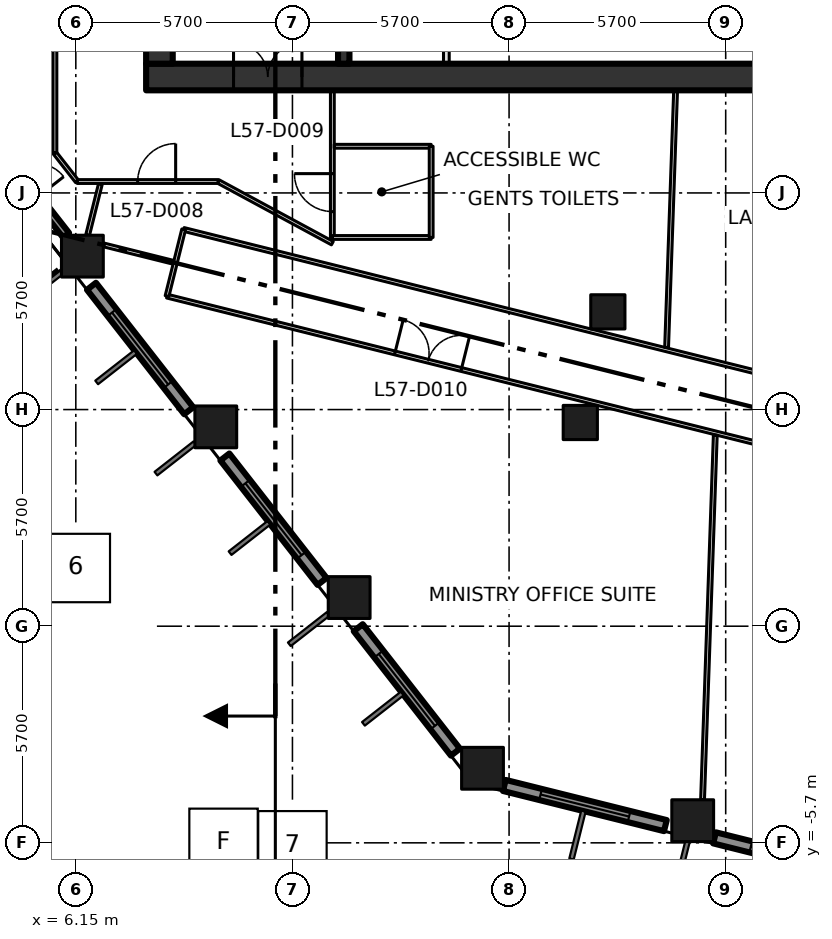
"""IFC4 building model, lengths in metres.
Left out: names, types, materials, properties, quantities, classifications, styles, units other than length and angle.
Written with IfcOpenShell. Run it as: python <this file> out.ifc"""

import sys

from ifc_helpers import new_model, si_unit, direction, frame, frame_2d, origin, origin_2d, place, context, subcontext, project, spatial, rectangle, extrude, element, fill, save


model = new_model("IFC4")
c1 = context("Model", 3, precision=1e-05, world=origin(), true_north=direction((0.0, 1.0)))
c2 = subcontext(c1, "Body", "Model", "MODEL_VIEW")
j1 = project(units=[si_unit("LENGTHUNIT", "METRE"), si_unit("PLANEANGLEUNIT", "RADIAN")], contexts=[c1])
p1 = place(None, origin())
s1 = spatial("IfcSite", under=j1, at=p1, CompositionType="ELEMENT")
p2 = place(p1, origin())
s2 = spatial("IfcBuilding", under=s1, at=p2, CompositionType="ELEMENT")
p3 = place(p2, frame((0.0, 0.0, 250.8)))
s3 = spatial("IfcBuildingStorey", under=s2, at=p3, CompositionType="ELEMENT", Elevation=250.8)
for number, where, z_axis, x_axis in (
    (1, (16.851, -3.738, 0.0), (0.0, 0.0, 1.0), (1.0, 0.0, 0.0)),
    (2, (13.342, 0.754, 0.0), (0.0, 0.0, 1.0), (1.0, 0.0, 0.0)),
    (3, (9.833, 5.245, 0.0), (0.0, 0.0, 1.0), (1.0, 0.0, 0.0)),
    (4, (6.323, 9.737, 0.0), (0.0, 0.0, 1.0), (1.0, 0.0, 0.0)),
    (5, (22.382, -5.117, 0.0), (0.0, 0.0, 1.0), (1.0, 0.0, 0.0)),
):
    element("IfcColumn", number, at=place(p3, frame(where, z_axis=z_axis, x_axis=x_axis)), inside=s3, PredefinedType="COLUMN", context=c2, shape_type="SweptSolid", body=[
        extrude(rectangle(XDim=1.1, YDim=1.1, at=origin_2d()), origin(), (0.0, 0.0, 1.0), 4.2),
    ])
for number, where, z_axis, x_axis in (
    (6, (19.424, 5.36, 0.0), (0.0, 0.0, 1.0), (1.0, 0.0, 0.0)),
    (7, (20.149, 8.271, 0.0), (0.0, 0.0, 1.0), (1.0, 0.0, 0.0)),
):
    element("IfcColumn", number, at=place(p3, frame(where, z_axis=z_axis, x_axis=x_axis)), inside=s3, PredefinedType="COLUMN", context=c2, shape_type="SweptSolid", body=[
        extrude(rectangle(XDim=0.9, YDim=0.9, at=origin_2d()), origin(), (0.0, 0.0, 1.0), 4.2),
    ])
p4 = place(p3, frame((8.0, 14.45, -0.3), z_axis=(0.0, 0.0, 1.0), x_axis=(1.0, 0.0, 0.0)))
e8 = element("IfcWall", 8, at=p4, inside=s3, PredefinedType="SHEAR", context=c2, shape_type="SweptSolid", body=[
    extrude(rectangle(XDim=22.8, YDim=0.7, at=frame_2d((11.4, 0.0))), origin(), (0.0, 0.0, 1.0), 4.2),
])
p5 = place(p4, frame((2.3, 0.0, 0.3)))
e9 = element("IfcOpeningElement", 9, at=p5, cuts=e8, PredefinedType="OPENING", context=c2, shape_type="SweptSolid", body=[
    extrude(rectangle(XDim=1.8, YDim=2.1, at=frame_2d((0.9, 1.05))), frame((0.0, 0.36, 0.0), z_axis=(0.0, -1.0, 0.0), x_axis=(1.0, 0.0, 0.0)), (0.0, 0.0, 1.0), 0.72),
])
p6 = place(p3, frame((8.35, 14.8, -0.3), z_axis=(0.0, 0.0, 1.0), x_axis=(0.0, 1.0, 0.0)))
e10 = element("IfcWall", 10, at=p6, inside=s3, PredefinedType="SHEAR", context=c2, shape_type="SweptSolid", body=[
    extrude(rectangle(XDim=20.9, YDim=0.7, at=frame_2d((10.45, 0.0))), origin(), (0.0, 0.0, 1.0), 4.2),
])
p7 = place(p3, frame((13.2, 14.8, 0.0), z_axis=(0.0, 0.0, 1.0), x_axis=(0.0, 1.0, 0.0)))
e11 = element("IfcWall", 11, at=p7, inside=s3, PredefinedType="SHEAR", context=c2, shape_type="SweptSolid", body=[
    extrude(rectangle(XDim=20.9, YDim=0.3, at=frame_2d((10.45, 0.0))), origin(), (0.0, 0.0, 1.0), 3.9),
])
p8 = place(p7, frame((3.5, 0.0, 0.0)))
e12 = element("IfcOpeningElement", 12, at=p8, cuts=e11, PredefinedType="OPENING", context=c2, shape_type="SweptSolid", body=[
    extrude(rectangle(XDim=1.8, YDim=2.1, at=frame_2d((0.9, 1.05))), frame((0.0, 0.16, 0.0), z_axis=(0.0, -1.0, 0.0), x_axis=(1.0, 0.0, 0.0)), (0.0, 0.0, 1.0), 0.32),
])
p9 = place(p7, frame((11.6, 0.0, 0.0)))
e13 = element("IfcOpeningElement", 13, at=p9, cuts=e11, PredefinedType="OPENING", context=c2, shape_type="SweptSolid", body=[
    extrude(rectangle(XDim=1.2, YDim=2.1, at=frame_2d((0.6, 1.05))), frame((0.0, 0.16, 0.0), z_axis=(0.0, -1.0, 0.0), x_axis=(1.0, 0.0, 0.0)), (0.0, 0.0, 1.0), 0.32),
])
p10 = place(p3, frame((15.9, 14.8, 0.0), z_axis=(0.0, 0.0, 1.0), x_axis=(0.0, 1.0, 0.0)))
e14 = element("IfcWall", 14, at=p10, inside=s3, PredefinedType="PARTITIONING", context=c2, shape_type="SweptSolid", body=[
    extrude(rectangle(XDim=2.825, YDim=0.15, at=frame_2d((1.413, 0.0))), origin(), (0.0, 0.0, 1.0), 3.9),
])
p11 = place(p3, frame((3.244, 13.679, 0.0), z_axis=(0.0, 0.0, 1.0), x_axis=(0.615682564618, -0.787994276392, 0.0)))
e15 = element("IfcWall", 15, at=p11, inside=s3, PredefinedType="SOLIDWALL", context=c2, shape_type="SweptSolid", body=[
    extrude(rectangle(XDim=4.304, YDim=0.2, at=frame_2d((2.152, 0.0))), origin(), (0.0, 0.0, 1.0), 3.15),
])
p12 = place(p11, frame((1.252, 0.0, 0.0)))
e16 = element("IfcOpeningElement", 16, at=p12, cuts=e15, PredefinedType="OPENING", context=c2, shape_type="SweptSolid", body=[
    extrude(rectangle(XDim=1.8, YDim=2.9, at=frame_2d((0.9, 1.45))), frame((0.0, 0.11, 0.0), z_axis=(0.0, -1.0, 0.0), x_axis=(1.0, 0.0, 0.0)), (0.0, 0.0, 1.0), 0.22),
])
p13 = place(p3, frame((6.562, 8.944, 0.0), z_axis=(0.0, 0.0, 1.0), x_axis=(0.615699893917, -0.787980736205, 0.0)))
e17 = element("IfcWall", 17, at=p13, inside=s3, PredefinedType="SOLIDWALL", context=c2, shape_type="SweptSolid", body=[
    extrude(rectangle(XDim=4.156, YDim=0.3, at=frame_2d((2.078, 0.0))), origin(), (0.0, 0.0, 1.0), 3.15),
])
p14 = place(p13, frame((0.878, 0.0, 0.8)))
e18 = element("IfcOpeningElement", 18, at=p14, cuts=e17, PredefinedType="OPENING", context=c2, shape_type="SweptSolid", body=[
    extrude(rectangle(XDim=2.4, YDim=2.1, at=frame_2d((1.2, 1.05))), frame((0.0, 0.16, 0.0), z_axis=(0.0, -1.0, 0.0), x_axis=(1.0, 0.0, 0.0)), (0.0, 0.0, 1.0), 0.32),
])
p15 = place(p3, frame((10.072, 4.452, 0.0), z_axis=(0.0, 0.0, 1.0), x_axis=(0.615660006568, -0.788011901124, 0.0)))
e19 = element("IfcWall", 19, at=p15, inside=s3, PredefinedType="SOLIDWALL", context=c2, shape_type="SweptSolid", body=[
    extrude(rectangle(XDim=4.155, YDim=0.3, at=frame_2d((2.077, 0.0))), origin(), (0.0, 0.0, 1.0), 3.15),
])
p16 = place(p15, frame((0.878, 0.0, 0.8)))
e20 = element("IfcOpeningElement", 20, at=p16, cuts=e19, PredefinedType="OPENING", context=c2, shape_type="SweptSolid", body=[
    extrude(rectangle(XDim=2.4, YDim=2.1, at=frame_2d((1.2, 1.05))), frame((0.0, 0.16, 0.0), z_axis=(0.0, -1.0, 0.0), x_axis=(1.0, 0.0, 0.0)), (0.0, 0.0, 1.0), 0.32),
])
p17 = place(p3, frame((13.581, -0.039, 0.0), z_axis=(0.0, 0.0, 1.0), x_axis=(0.615545986363, -0.788100969846, 0.0)))
e21 = element("IfcWall", 21, at=p17, inside=s3, PredefinedType="SOLIDWALL", context=c2, shape_type="SweptSolid", body=[
    extrude(rectangle(XDim=4.156, YDim=0.3, at=frame_2d((2.078, 0.0))), origin(), (0.0, 0.0, 1.0), 3.15),
])
p18 = place(p17, frame((0.878, 0.0, 0.8)))
e22 = element("IfcOpeningElement", 22, at=p18, cuts=e21, PredefinedType="OPENING", context=c2, shape_type="SweptSolid", body=[
    extrude(rectangle(XDim=2.4, YDim=2.1, at=frame_2d((1.2, 1.05))), frame((0.0, 0.16, 0.0), z_axis=(0.0, -1.0, 0.0), x_axis=(1.0, 0.0, 0.0)), (0.0, 0.0, 1.0), 0.32),
])
p19 = place(p3, frame((17.425, -4.19, 0.0), z_axis=(0.0, 0.0, 1.0), x_axis=(0.970270592847, -0.242022677978, 0.0)))
e23 = element("IfcWall", 23, at=p19, inside=s3, PredefinedType="SOLIDWALL", context=c2, shape_type="SweptSolid", body=[
    extrude(rectangle(XDim=4.368, YDim=0.3, at=frame_2d((2.184, 0.0))), origin(), (0.0, 0.0, 1.0), 3.15),
])
p20 = place(p19, frame((0.983, 0.0, 0.8)))
e24 = element("IfcOpeningElement", 24, at=p20, cuts=e23, PredefinedType="OPENING", context=c2, shape_type="SweptSolid", body=[
    extrude(rectangle(XDim=2.4, YDim=2.1, at=frame_2d((1.2, 1.05))), frame((0.0, 0.16, 0.0), z_axis=(0.0, -1.0, 0.0), x_axis=(1.0, 0.0, 0.0)), (0.0, 0.0, 1.0), 0.32),
])
p21 = place(p3, frame((22.956, -5.569, 0.0), z_axis=(0.0, 0.0, 1.0), x_axis=(0.970323116569, -0.241812012628, 0.0)))
e25 = element("IfcWall", 25, at=p21, inside=s3, PredefinedType="SOLIDWALL", context=c2, shape_type="SweptSolid", body=[
    extrude(rectangle(XDim=4.367, YDim=0.3, at=frame_2d((2.183, 0.0))), origin(), (0.0, 0.0, 1.0), 3.15),
])
p22 = place(p21, frame((0.983, 0.0, 0.8)))
e26 = element("IfcOpeningElement", 26, at=p22, cuts=e25, PredefinedType="OPENING", context=c2, shape_type="SweptSolid", body=[
    extrude(rectangle(XDim=2.4, YDim=2.1, at=frame_2d((1.2, 1.05))), frame((0.0, 0.16, 0.0), z_axis=(0.0, -1.0, 0.0), x_axis=(1.0, 0.0, 0.0)), (0.0, 0.0, 1.0), 0.32),
])
p23 = place(p3, frame((5.6, 12.45, 0.0), z_axis=(0.0, 0.0, 1.0), x_axis=(0.615644041972, -0.788024373725, 0.0)))
e27 = element("IfcWall", 27, at=p23, inside=s3, PredefinedType="PARTITIONING", context=c2, shape_type="SweptSolid", body=[
    extrude(rectangle(XDim=0.952, YDim=0.1, at=frame_2d((0.476, 0.0))), origin(), (0.0, 0.0, 1.0), 3.9),
])
p24 = place(p3, frame((5.6, 39.205, 0.0), z_axis=(0.0, 0.0, 1.0), x_axis=(0.0, -1.0, 0.0)))
e28 = element("IfcWall", 28, at=p24, inside=s3, PredefinedType="PARTITIONING", context=c2, shape_type="SweptSolid", body=[
    extrude(rectangle(XDim=26.755, YDim=0.1, at=frame_2d((13.377, 0.0))), origin(), (0.0, 0.0, 1.0), 3.9),
])
p25 = place(p24, frame((18.667, 0.0, 0.0)))
e29 = element("IfcOpeningElement", 29, at=p25, cuts=e28, PredefinedType="OPENING", context=c2, shape_type="SweptSolid", body=[
    extrude(rectangle(XDim=1.0, YDim=2.1, at=frame_2d((0.5, 1.05))), frame((0.0, 0.06, 0.0), z_axis=(0.0, -1.0, 0.0), x_axis=(1.0, 0.0, 0.0)), (0.0, 0.0, 1.0), 0.12),
])
p26 = place(p24, frame((5.08, 0.0, 0.0)))
e30 = element("IfcOpeningElement", 30, at=p26, cuts=e28, PredefinedType="OPENING", context=c2, shape_type="SweptSolid", body=[
    extrude(rectangle(XDim=1.0, YDim=2.1, at=frame_2d((0.5, 1.05))), frame((0.0, 0.06, 0.0), z_axis=(0.0, -1.0, 0.0), x_axis=(1.0, 0.0, 0.0)), (0.0, 0.0, 1.0), 0.12),
])
p27 = place(p3, frame((6.186, 11.7, 0.0), z_axis=(0.0, 0.0, 1.0), x_axis=(1.0, 0.0, 0.0)))
e31 = element("IfcWall", 31, at=p27, inside=s3, PredefinedType="PARTITIONING", context=c2, shape_type="SweptSolid", body=[
    extrude(rectangle(XDim=3.714, YDim=0.1, at=frame_2d((1.857, 0.0))), origin(), (0.0, 0.0, 1.0), 3.9),
])
p28 = place(p27, frame((1.591, 0.0, 0.0)))
e32 = element("IfcOpeningElement", 32, at=p28, cuts=e31, PredefinedType="OPENING", context=c2, shape_type="SweptSolid", body=[
    extrude(rectangle(XDim=1.0, YDim=2.1, at=frame_2d((0.5, 1.05))), frame((0.0, 0.06, 0.0), z_axis=(0.0, -1.0, 0.0), x_axis=(1.0, 0.0, 0.0)), (0.0, 0.0, 1.0), 0.12),
])
p29 = place(p3, frame((8.55, 8.685, 0.0), z_axis=(0.0, 0.0, 1.0), x_axis=(0.970298026101, -0.241912671319, 0.0)))
e33 = element("IfcWall", 33, at=p29, inside=s3, PredefinedType="PARTITIONING", context=c2, shape_type="SweptSolid", body=[
    extrude(rectangle(XDim=51.275, YDim=0.1, at=frame_2d((25.637, 0.0))), origin(), (0.0, 0.0, 1.0), 3.9),
])
p30 = place(p29, frame((19.45, 0.0, 0.0)))
e34 = element("IfcOpeningElement", 34, at=p30, cuts=e33, PredefinedType="OPENING", context=c2, shape_type="SweptSolid", body=[
    extrude(rectangle(XDim=1.8, YDim=2.1, at=frame_2d((0.9, 1.05))), frame((0.0, 0.06, 0.0), z_axis=(0.0, -1.0, 0.0), x_axis=(1.0, 0.0, 0.0)), (0.0, 0.0, 1.0), 0.12),
])
p31 = place(p29, frame((31.35, 0.0, 0.0)))
e35 = element("IfcOpeningElement", 35, at=p31, cuts=e33, PredefinedType="OPENING", context=c2, shape_type="SweptSolid", body=[
    extrude(rectangle(XDim=1.8, YDim=2.1, at=frame_2d((0.9, 1.05))), frame((0.0, 0.06, 0.0), z_axis=(0.0, -1.0, 0.0), x_axis=(1.0, 0.0, 0.0)), (0.0, 0.0, 1.0), 0.12),
])
p32 = place(p29, frame((6.18, 0.0, 0.0)))
e36 = element("IfcOpeningElement", 36, at=p32, cuts=e33, PredefinedType="OPENING", context=c2, shape_type="SweptSolid", body=[
    extrude(rectangle(XDim=1.8, YDim=2.1, at=frame_2d((0.9, 1.05))), frame((0.0, 0.06, 0.0), z_axis=(0.0, -1.0, 0.0), x_axis=(1.0, 0.0, 0.0)), (0.0, 0.0, 1.0), 0.12),
])
p33 = place(p3, frame((8.988, 10.44, 0.0), z_axis=(0.0, 0.0, 1.0), x_axis=(0.970301223092, -0.241899848006, 0.0)))
e37 = element("IfcWall", 37, at=p33, inside=s3, PredefinedType="PARTITIONING", context=c2, shape_type="SweptSolid", body=[
    extrude(rectangle(XDim=19.879, YDim=0.1, at=frame_2d((9.94, 0.0))), origin(), (0.0, 0.0, 1.0), 3.9),
])
p34 = place(p3, frame((8.988, 10.44, 0.0), z_axis=(0.0, 0.0, 1.0), x_axis=(-0.242154485745, -0.970237705428, 0.0)))
e38 = element("IfcWall", 38, at=p34, inside=s3, PredefinedType="PARTITIONING", context=c2, shape_type="SweptSolid", body=[
    extrude(rectangle(XDim=1.809, YDim=0.1, at=frame_2d((0.904, 0.0))), origin(), (0.0, 0.0, 1.0), 3.9),
])
p35 = place(p3, frame((9.9, 11.7, 0.0), z_axis=(0.0, 0.0, 1.0), x_axis=(0.87965147249, -0.475618846291, 0.0)))
e39 = element("IfcWall", 39, at=p35, inside=s3, PredefinedType="PARTITIONING", context=c2, shape_type="SweptSolid", body=[
    extrude(rectangle(XDim=3.41, YDim=0.1, at=frame_2d((1.705, 0.0))), origin(), (0.0, 0.0, 1.0), 3.9),
])
p36 = place(p3, frame((12.9, 10.228, 0.0), z_axis=(0.0, 0.0, 1.0), x_axis=(0.0, 1.0, 0.0)))
e40 = element("IfcWall", 40, at=p36, inside=s3, PredefinedType="PARTITIONING", context=c2, shape_type="SweptSolid", body=[
    extrude(rectangle(XDim=3.872, YDim=0.1, at=frame_2d((1.936, 0.0))), origin(), (0.0, 0.0, 1.0), 3.9),
])
p37 = place(p36, frame((0.68, 0.0, 0.0)))
e41 = element("IfcOpeningElement", 41, at=p37, cuts=e40, PredefinedType="OPENING", context=c2, shape_type="SweptSolid", body=[
    extrude(rectangle(XDim=1.0, YDim=2.1, at=frame_2d((0.5, 1.05))), frame((0.0, 0.06, 0.0), z_axis=(0.0, -1.0, 0.0), x_axis=(1.0, 0.0, 0.0)), (0.0, 0.0, 1.0), 0.12),
])
p38 = place(p3, frame((6.797, 11.638, 0.0), z_axis=(0.0, 0.0, 1.0), x_axis=(-0.242164268782, -0.970235263699, 0.0)))
e42 = element("IfcWall", 42, at=p38, inside=s3, PredefinedType="PARTITIONING", context=c2, shape_type="SweptSolid", body=[
    extrude(rectangle(XDim=1.392, YDim=0.1, at=frame_2d((0.696, 0.0))), origin(), (0.0, 0.0, 1.0), 3.9),
])
p39 = place(p3, frame((8.72, 9.574, 0.0), z_axis=(0.0, 0.0, 1.0), x_axis=(-0.970240497311, 0.242143299263, 0.0)))
e43 = element("IfcWall", 43, at=p39, inside=s3, PredefinedType="PARTITIONING", context=c2, shape_type="SweptSolid", body=[
    extrude(rectangle(XDim=1.904, YDim=0.1, at=frame_2d((0.952, 0.0))), origin(), (0.0, 0.0, 1.0), 3.9),
])
p40 = place(p3, frame((12.95, 12.628, 0.0), z_axis=(0.0, 0.0, 1.0), x_axis=(1.0, 0.0, 0.0)))
e44 = element("IfcWall", 44, at=p40, inside=s3, PredefinedType="PARTITIONING", context=c2, shape_type="SweptSolid", body=[
    extrude(rectangle(XDim=2.55, YDim=0.1, at=frame_2d((1.275, 0.0))), origin(), (0.0, 0.0, 1.0), 3.9),
])
p41 = place(p3, frame((15.5, 10.228, 0.0), z_axis=(0.0, 0.0, 1.0), x_axis=(-1.0, 0.0, 0.0)))
e45 = element("IfcWall", 45, at=p41, inside=s3, PredefinedType="PARTITIONING", context=c2, shape_type="SweptSolid", body=[
    extrude(rectangle(XDim=2.6, YDim=0.1, at=frame_2d((1.3, 0.0))), origin(), (0.0, 0.0, 1.0), 3.9),
])
p42 = place(p3, frame((15.5, 12.628, 0.0), z_axis=(0.0, 0.0, 1.0), x_axis=(0.0, -1.0, 0.0)))
e46 = element("IfcWall", 46, at=p42, inside=s3, PredefinedType="PARTITIONING", context=c2, shape_type="SweptSolid", body=[
    extrude(rectangle(XDim=2.4, YDim=0.1, at=frame_2d((1.2, 0.0))), origin(), (0.0, 0.0, 1.0), 3.9),
])
p43 = place(p3, frame((21.695, 7.334, 0.0), z_axis=(0.0, 0.0, 1.0), x_axis=(0.034978942342, 0.999388049555, 0.0)))
e47 = element("IfcWall", 47, at=p43, inside=s3, PredefinedType="PARTITIONING", context=c2, shape_type="SweptSolid", body=[
    extrude(rectangle(XDim=6.77, YDim=0.1, at=frame_2d((3.385, 0.0))), origin(), (0.0, 0.0, 1.0), 3.9),
])
p44 = place(p3, frame((22.641, -4.567, 0.0), z_axis=(0.0, 0.0, 1.0), x_axis=(0.034896781654, 0.999390921827, 0.0)))
e48 = element("IfcWall", 48, at=p44, inside=s3, PredefinedType="PARTITIONING", context=c2, shape_type="SweptSolid", body=[
    extrude(rectangle(XDim=9.599, YDim=0.1, at=frame_2d((4.799, 0.0))), origin(), (0.0, 0.0, 1.0), 3.9),
])
p45 = place(p5, origin())
e49 = element("IfcDoor", 49, at=p45, inside=s3, OperationType="DOUBLE_DOOR_SINGLE_SWING", PredefinedType="DOOR", context=c2, shape_type="SweptSolid", body=[
    extrude(rectangle(XDim=1.8, YDim=2.1, at=frame_2d((0.9, 1.05))), frame((0.0, 0.025, 0.0), z_axis=(0.0, -1.0, 0.0), x_axis=(1.0, 0.0, 0.0)), (0.0, 0.0, 1.0), 0.05),
])
fill(e9, e49)
p46 = place(p14, origin())
e50 = element("IfcWindow", 50, at=p46, inside=s3, PartitioningType="DOUBLE_PANEL_VERTICAL", PredefinedType="WINDOW", context=c2, shape_type="SweptSolid", body=[
    extrude(rectangle(XDim=2.4, YDim=2.1, at=frame_2d((1.2, 1.05))), frame((0.0, 0.03, 0.0), z_axis=(0.0, -1.0, 0.0), x_axis=(1.0, 0.0, 0.0)), (0.0, 0.0, 1.0), 0.06),
])
fill(e18, e50)
p47 = place(p16, origin())
e51 = element("IfcWindow", 51, at=p47, inside=s3, PartitioningType="DOUBLE_PANEL_VERTICAL", PredefinedType="WINDOW", context=c2, shape_type="SweptSolid", body=[
    extrude(rectangle(XDim=2.4, YDim=2.1, at=frame_2d((1.2, 1.05))), frame((0.0, 0.03, 0.0), z_axis=(0.0, -1.0, 0.0), x_axis=(1.0, 0.0, 0.0)), (0.0, 0.0, 1.0), 0.06),
])
fill(e20, e51)
p48 = place(p18, origin())
e52 = element("IfcWindow", 52, at=p48, inside=s3, PartitioningType="DOUBLE_PANEL_VERTICAL", PredefinedType="WINDOW", context=c2, shape_type="SweptSolid", body=[
    extrude(rectangle(XDim=2.4, YDim=2.1, at=frame_2d((1.2, 1.05))), frame((0.0, 0.03, 0.0), z_axis=(0.0, -1.0, 0.0), x_axis=(1.0, 0.0, 0.0)), (0.0, 0.0, 1.0), 0.06),
])
fill(e22, e52)
p49 = place(p20, origin())
e53 = element("IfcWindow", 53, at=p49, inside=s3, PartitioningType="DOUBLE_PANEL_VERTICAL", PredefinedType="WINDOW", context=c2, shape_type="SweptSolid", body=[
    extrude(rectangle(XDim=2.4, YDim=2.1, at=frame_2d((1.2, 1.05))), frame((0.0, 0.03, 0.0), z_axis=(0.0, -1.0, 0.0), x_axis=(1.0, 0.0, 0.0)), (0.0, 0.0, 1.0), 0.06),
])
fill(e24, e53)
p50 = place(p22, origin())
e54 = element("IfcWindow", 54, at=p50, inside=s3, PartitioningType="DOUBLE_PANEL_VERTICAL", PredefinedType="WINDOW", context=c2, shape_type="SweptSolid", body=[
    extrude(rectangle(XDim=2.4, YDim=2.1, at=frame_2d((1.2, 1.05))), frame((0.0, 0.03, 0.0), z_axis=(0.0, -1.0, 0.0), x_axis=(1.0, 0.0, 0.0)), (0.0, 0.0, 1.0), 0.06),
])
fill(e26, e54)
p51 = place(p28, origin())
e55 = element("IfcDoor", 55, at=p51, inside=s3, OperationType="SINGLE_SWING_RIGHT", PredefinedType="DOOR", context=c2, shape_type="SweptSolid", body=[
    extrude(rectangle(XDim=1.0, YDim=2.1, at=frame_2d((0.5, 1.05))), frame((0.0, 0.025, 0.0), z_axis=(0.0, -1.0, 0.0), x_axis=(1.0, 0.0, 0.0)), (0.0, 0.0, 1.0), 0.05),
])
fill(e32, e55)
p52 = place(p37, origin())
e56 = element("IfcDoor", 56, at=p52, inside=s3, OperationType="SINGLE_SWING_RIGHT", PredefinedType="DOOR", context=c2, shape_type="SweptSolid", body=[
    extrude(rectangle(XDim=1.0, YDim=2.1, at=frame_2d((0.5, 1.05))), frame((0.0, 0.025, 0.0), z_axis=(0.0, -1.0, 0.0), x_axis=(1.0, 0.0, 0.0)), (0.0, 0.0, 1.0), 0.05),
])
fill(e41, e56)
p53 = place(p32, origin())
e57 = element("IfcDoor", 57, at=p53, inside=s3, OperationType="DOUBLE_DOOR_SINGLE_SWING", PredefinedType="DOOR", context=c2, shape_type="SweptSolid", body=[
    extrude(rectangle(XDim=1.8, YDim=2.1, at=frame_2d((0.9, 1.05))), frame((0.0, 0.025, 0.0), z_axis=(0.0, -1.0, 0.0), x_axis=(1.0, 0.0, 0.0)), (0.0, 0.0, 1.0), 0.05),
])
fill(e36, e57)
save(model, sys.argv[1])
